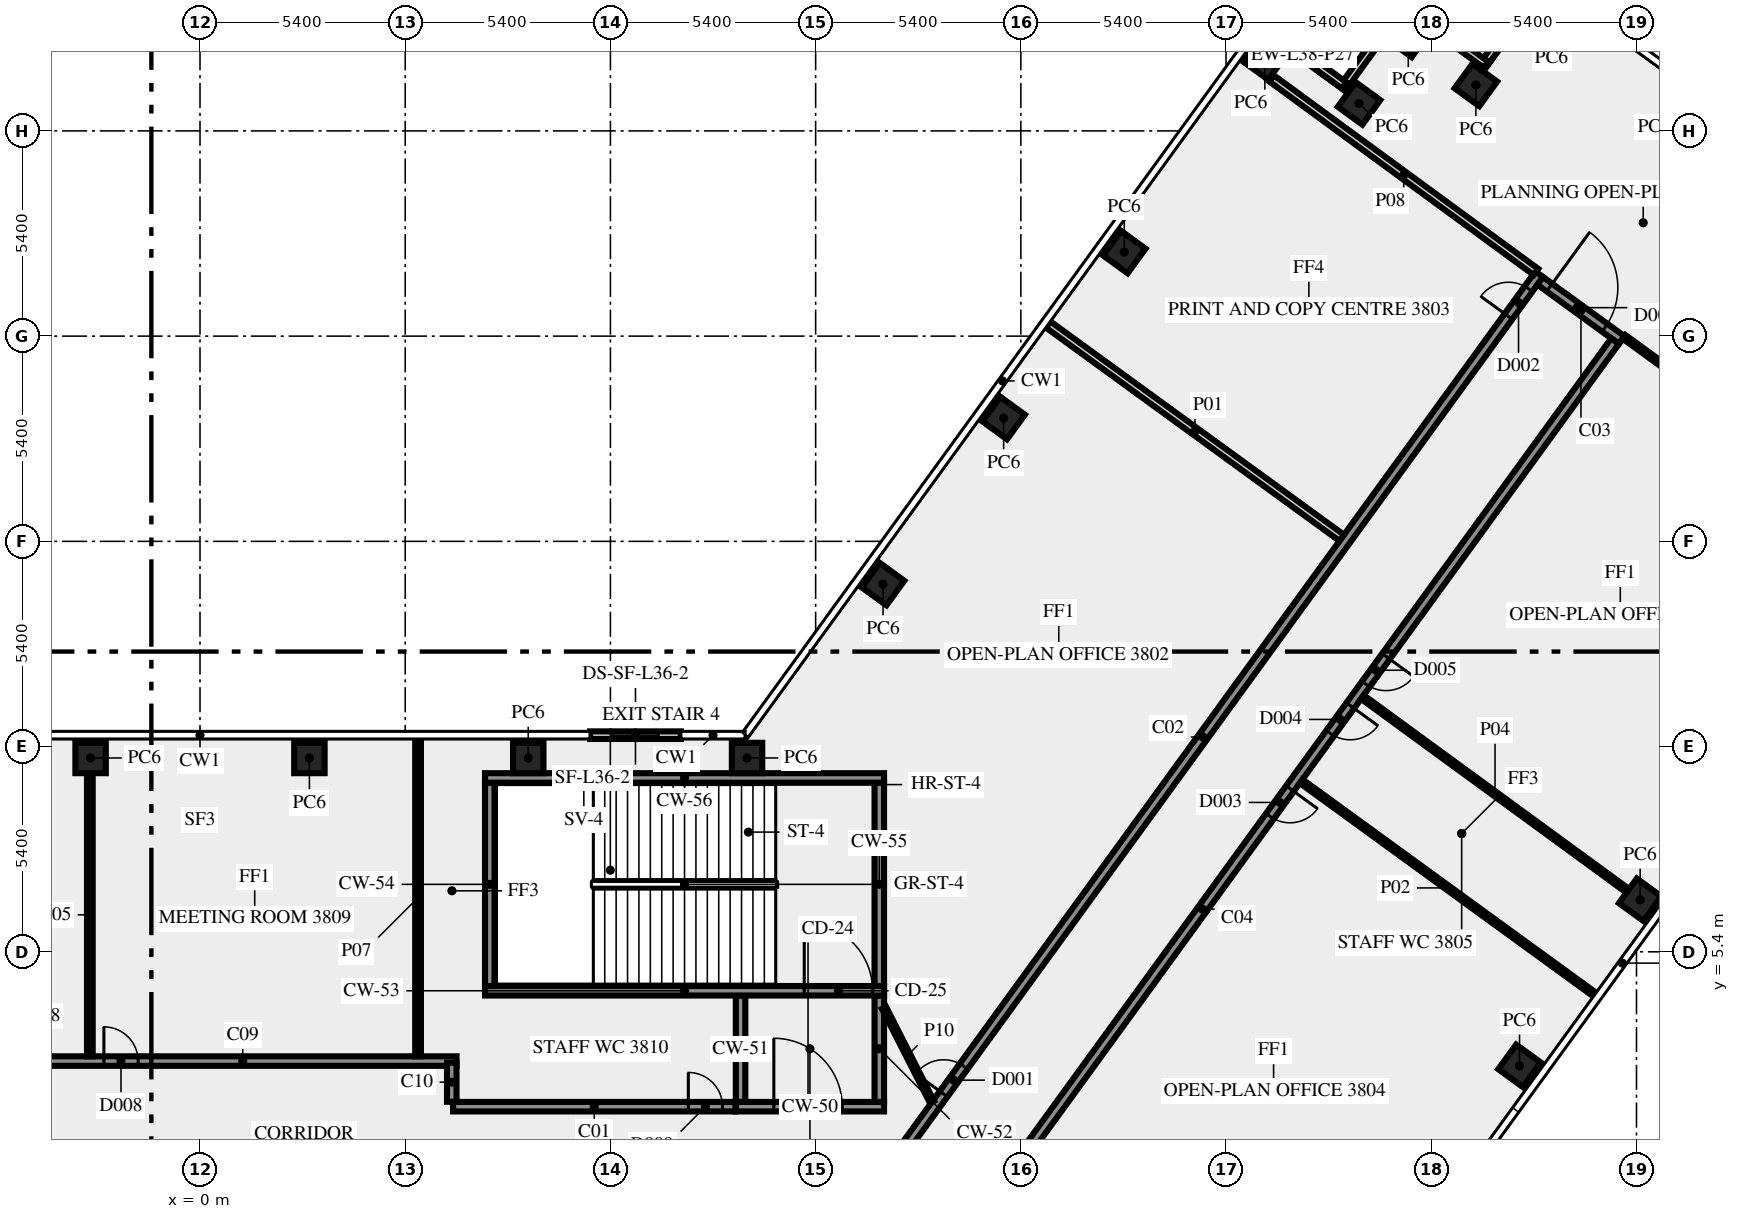
"""IFC4 building model, lengths in metres.
Left out: names, types, materials, properties, quantities, classifications, styles, units other than length and angle.
Written with IfcOpenShell. Run it as: python <this file> out.ifc"""

import sys

from ifc_helpers import new_model, si_unit, direction, frame, frame_2d, origin, origin_2d, place, context, subcontext, project, spatial, rectangle, extrude, element, fill, save


model = new_model("IFC4")
c1 = context("Model", 3, precision=1e-05, world=origin(), true_north=direction((0.0, 1.0)))
c2 = subcontext(c1, "Body", "Model", "MODEL_VIEW")
j1 = project(units=[si_unit("LENGTHUNIT", "METRE"), si_unit("PLANEANGLEUNIT", "RADIAN")], contexts=[c1])
p1 = place(None, origin())
s1 = spatial("IfcSite", under=j1, at=p1, CompositionType="ELEMENT")
p2 = place(p1, origin())
s2 = spatial("IfcBuilding", under=s1, at=p2, CompositionType="ELEMENT")
p3 = place(p2, frame((0.0, 0.0, 164.0)))
s3 = spatial("IfcBuildingStorey", under=s2, at=p3, CompositionType="ELEMENT", Elevation=164.0)
for number, where, z_axis, x_axis in (
    (1, (34.722, 2.4, 0.0), (0.0, 0.0, 1.0), (0.588, 0.809, 0.0)),
    (2, (37.896, 6.769, 0.0), (0.0, 0.0, 1.0), (0.588, 0.809, 0.0)),
    (3, (33.574, 28.209, 0.0), (0.0, 0.0, 1.0), (-0.809, 0.588, 0.0)),
    (4, (31.795, 29.5, 0.0), (0.0, 0.0, 1.0), (-0.588, -0.809, 0.0)),
    (5, (30.499, 27.723, 0.0), (0.0, 0.0, 1.0), (-0.809, 0.588, 0.0)),
    (6, (28.02, 28.905, 0.0), (0.0, 0.0, 1.0), (-0.809, 0.588, 0.0)),
    (7, (24.321, 23.812, 0.0), (0.0, 0.0, 1.0), (-0.588, -0.809, 0.0)),
    (8, (21.147, 19.444, 0.0), (0.0, 0.0, 1.0), (-0.588, -0.809, 0.0)),
    (9, (17.974, 15.075, 0.0), (0.0, 0.0, 1.0), (-0.588, -0.809, 0.0)),
    (10, (14.395, 10.5, 0.0), (0.0, 0.0, 1.0), (-1.0, 0.0, 0.0)),
    (11, (8.637, 10.5, 0.0), (0.0, 0.0, 1.0), (-1.0, 0.0, 0.0)),
    (12, (2.879, 10.5, 0.0), (0.0, 0.0, 1.0), (-1.0, 0.0, 0.0)),
    (13, (-2.879, 10.5, 0.0), (0.0, 0.0, 1.0), (-1.0, 0.0, 0.0)),
):
    element("IfcColumn", number, at=place(p3, frame(where, z_axis=z_axis, x_axis=x_axis)), inside=s3, PredefinedType="COLUMN", context=c2, shape_type="SweptSolid", body=[
        extrude(rectangle(XDim=0.8, YDim=0.8, at=origin_2d()), origin(), (0.0, 0.0, 1.0), 3.65),
    ])
for number, where, z_axis, x_axis in (
    (14, (35.388, 30.97, 0.0), (0.0, 0.0, 1.0), (-0.588, -0.809, 0.0)),
    (15, (33.838, 28.744, 0.0), (0.0, 0.0, 1.0), (-0.809, 0.588, 0.0)),
    (16, (31.67, 30.333, 0.0), (0.0, 0.0, 1.0), (-0.588, -0.809, 0.0)),
    (17, (30.106, 28.2, 0.0), (0.0, 0.0, 1.0), (-0.809, 0.588, 0.0)),
):
    element("IfcWall", number, at=place(p3, frame(where, z_axis=z_axis, x_axis=x_axis)), inside=s3, PredefinedType="SOLIDWALL", context=c2, shape_type="SweptSolid", body=[
        extrude(rectangle(XDim=2.7, YDim=0.2, at=frame_2d((1.35, 0.0))), origin(), (0.0, 0.0, 1.0), 3.65),
    ])
p4 = place(p3, frame((12.655, 11.1, 0.0), z_axis=(0.0, 0.0, 1.0), x_axis=(-1.0, 0.0, 0.0)))
e18 = element("IfcWall", 18, at=p4, inside=s3, PredefinedType="SOLIDWALL", context=c2, shape_type="SweptSolid", body=[
    extrude(rectangle(XDim=2.392, YDim=0.2, at=frame_2d((1.196, 0.0))), origin(), (0.0, 0.0, 1.0), 3.65),
])
p5 = place(p4, frame((0.596, 0.0, 1.0)))
e19 = element("IfcOpeningElement", 19, at=p5, cuts=e18, PredefinedType="OPENING", context=c2, shape_type="SweptSolid", body=[
    extrude(rectangle(XDim=1.2, YDim=1.2, at=frame_2d((0.6, 0.6))), frame((0.0, 0.11, 0.0), z_axis=(0.0, -1.0, 0.0), x_axis=(1.0, 0.0, 0.0)), (0.0, 0.0, 1.0), 0.22),
])
p6 = place(p3, frame((14.1, 1.325, 0.0), z_axis=(0.0, 0.0, 1.0), x_axis=(1.0, 0.0, 0.0)))
e20 = element("IfcWall", 20, at=p6, inside=s3, PredefinedType="SHEAR", context=c2, shape_type="SweptSolid", body=[
    extrude(rectangle(XDim=3.9, YDim=0.25, at=frame_2d((1.95, 0.0))), origin(), (0.0, 0.0, 1.0), 3.65),
])
p7 = place(p6, frame((1.0, 0.0, 0.0)))
e21 = element("IfcOpeningElement", 21, at=p7, cuts=e20, PredefinedType="OPENING", context=c2, shape_type="SweptSolid", body=[
    extrude(rectangle(XDim=1.8, YDim=2.1, at=frame_2d((0.9, 1.05))), frame((0.0, 0.135, 0.0), z_axis=(0.0, -1.0, 0.0), x_axis=(1.0, 0.0, 0.0)), (0.0, 0.0, 1.0), 0.27),
])
for number, where, z_axis, x_axis in (
    (22, (14.225, 1.45, 0.0), (0.0, 0.0, 1.0), (0.0, 1.0, 0.0)),
    (23, (17.875, 1.45, 0.0), (0.0, 0.0, 1.0), (0.0, 1.0, 0.0)),
):
    element("IfcWall", number, at=place(p3, frame(where, z_axis=z_axis, x_axis=x_axis)), inside=s3, PredefinedType="SHEAR", context=c2, shape_type="SweptSolid", body=[
        extrude(rectangle(XDim=2.8, YDim=0.25, at=frame_2d((1.4, 0.0))), origin(), (0.0, 0.0, 1.0), 3.65),
    ])
p8 = place(p3, frame((7.5, 4.375, 0.0), z_axis=(0.0, 0.0, 1.0), x_axis=(1.0, 0.0, 0.0)))
e24 = element("IfcWall", 24, at=p8, inside=s3, PredefinedType="SHEAR", context=c2, shape_type="SweptSolid", body=[
    extrude(rectangle(XDim=10.5, YDim=0.25, at=frame_2d((5.25, 0.0))), origin(), (0.0, 0.0, 1.0), 3.65),
])
p9 = place(p8, frame((8.4, 0.0, 0.0)))
e25 = element("IfcOpeningElement", 25, at=p9, cuts=e24, PredefinedType="OPENING", context=c2, shape_type="SweptSolid", body=[
    extrude(rectangle(XDim=1.8, YDim=2.1, at=frame_2d((0.9, 1.05))), frame((0.0, 0.135, 0.0), z_axis=(0.0, -1.0, 0.0), x_axis=(1.0, 0.0, 0.0)), (0.0, 0.0, 1.0), 0.27),
])
for number, where, z_axis, x_axis in (
    (26, (7.625, 4.5, 0.0), (0.0, 0.0, 1.0), (0.0, 1.0, 0.0)),
    (27, (17.875, 4.5, 0.0), (0.0, 0.0, 1.0), (0.0, 1.0, 0.0)),
):
    element("IfcWall", number, at=place(p3, frame(where, z_axis=z_axis, x_axis=x_axis)), inside=s3, PredefinedType="SHEAR", context=c2, shape_type="SweptSolid", body=[
        extrude(rectangle(XDim=5.35, YDim=0.25, at=frame_2d((2.675, 0.0))), origin(), (0.0, 0.0, 1.0), 3.65),
    ])
p10 = place(p3, frame((7.5, 9.975, 0.0), z_axis=(0.0, 0.0, 1.0), x_axis=(1.0, 0.0, 0.0)))
e28 = element("IfcWall", 28, at=p10, inside=s3, PredefinedType="SHEAR", context=c2, shape_type="SweptSolid", body=[
    extrude(rectangle(XDim=10.5, YDim=0.25, at=frame_2d((5.25, 0.0))), origin(), (0.0, 0.0, 1.0), 3.65),
])
p11 = place(p10, frame((2.0, 0.0, 1.0)))
e29 = element("IfcOpeningElement", 29, at=p11, cuts=e28, PredefinedType="OPENING", context=c2, shape_type="SweptSolid", body=[
    extrude(rectangle(XDim=1.2, YDim=1.2, at=frame_2d((0.6, 0.6))), frame((0.0, 0.135, 0.0), z_axis=(0.0, -1.0, 0.0), x_axis=(1.0, 0.0, 0.0)), (0.0, 0.0, 1.0), 0.27),
])
p12 = place(p3, frame((6.659, 1.325, 0.0), z_axis=(0.0, 0.0, 1.0), x_axis=(1.0, 0.0, 0.0)))
e30 = element("IfcWall", 30, at=p12, inside=s3, PredefinedType="SOLIDWALL", context=c2, shape_type="SweptSolid", body=[
    extrude(rectangle(XDim=7.431, YDim=0.25, at=frame_2d((3.716, 0.0))), origin(), (0.0, 0.0, 1.0), 3.65),
])
p13 = place(p12, frame((6.191, 0.0, 0.0)))
e31 = element("IfcOpeningElement", 31, at=p13, cuts=e30, PredefinedType="OPENING", context=c2, shape_type="SweptSolid", body=[
    extrude(rectangle(XDim=0.9, YDim=2.1, at=frame_2d((0.45, 1.05))), frame((0.0, 0.135, 0.0), z_axis=(0.0, -1.0, 0.0), x_axis=(1.0, 0.0, 0.0)), (0.0, 0.0, 1.0), 0.27),
])
p14 = place(p3, frame((17.545, -1.125, 0.0), z_axis=(0.0, 0.0, 1.0), x_axis=(0.587786330937, 0.809016210693, 0.0)))
e32 = element("IfcWall", 32, at=p14, inside=s3, PredefinedType="SOLIDWALL", context=c2, shape_type="SweptSolid", body=[
    extrude(rectangle(XDim=30.103, YDim=0.25, at=frame_2d((15.052, 0.0))), origin(), (0.0, 0.0, 1.0), 3.65),
])
p15 = place(p14, frame((3.441, 0.0, 0.0)))
e33 = element("IfcOpeningElement", 33, at=p15, cuts=e32, PredefinedType="OPENING", context=c2, shape_type="SweptSolid", body=[
    extrude(rectangle(XDim=0.9, YDim=2.1, at=frame_2d((0.45, 1.05))), frame((0.0, 0.135, 0.0), z_axis=(0.0, -1.0, 0.0), x_axis=(1.0, 0.0, 0.0)), (0.0, 0.0, 1.0), 0.27),
])
p16 = place(p14, frame((28.729, 0.0, 0.0)))
e34 = element("IfcOpeningElement", 34, at=p16, cuts=e32, PredefinedType="OPENING", context=c2, shape_type="SweptSolid", body=[
    extrude(rectangle(XDim=0.9, YDim=2.1, at=frame_2d((0.45, 1.05))), frame((0.0, 0.135, 0.0), z_axis=(0.0, -1.0, 0.0), x_axis=(1.0, 0.0, 0.0)), (0.0, 0.0, 1.0), 0.27),
])
p17 = place(p3, frame((35.267, 23.054, 0.0), z_axis=(0.0, 0.0, 1.0), x_axis=(0.809038743598, -0.587755315891, 0.0)))
e35 = element("IfcWall", 35, at=p17, inside=s3, PredefinedType="SOLIDWALL", context=c2, shape_type="SweptSolid", body=[
    extrude(rectangle(XDim=2.65, YDim=0.25, at=frame_2d((1.325, 0.0))), origin(), (0.0, 0.0, 1.0), 3.65),
])
p18 = place(p17, frame((0.3, 0.0, 0.0)))
e36 = element("IfcOpeningElement", 36, at=p18, cuts=e35, PredefinedType="OPENING", context=c2, shape_type="SweptSolid", body=[
    extrude(rectangle(XDim=1.8, YDim=2.1, at=frame_2d((0.9, 1.05))), frame((0.0, 0.135, 0.0), z_axis=(0.0, -1.0, 0.0), x_axis=(1.0, 0.0, 0.0)), (0.0, 0.0, 1.0), 0.27),
])
p19 = place(p3, frame((37.236, 21.469, 0.0), z_axis=(0.0, 0.0, 1.0), x_axis=(-0.58778344073, -0.809018310549, 0.0)))
e37 = element("IfcWall", 37, at=p19, inside=s3, PredefinedType="SOLIDWALL", context=c2, shape_type="SweptSolid", body=[
    extrude(rectangle(XDim=28.42, YDim=0.25, at=frame_2d((14.21, 0.0))), origin(), (0.0, 0.0, 1.0), 3.65),
])
p20 = place(p19, frame((14.554, 0.0, 0.0)))
e38 = element("IfcOpeningElement", 38, at=p20, cuts=e37, PredefinedType="OPENING", context=c2, shape_type="SweptSolid", body=[
    extrude(rectangle(XDim=0.9, YDim=2.1, at=frame_2d((0.45, 1.05))), frame((0.0, 0.135, 0.0), z_axis=(0.0, -1.0, 0.0), x_axis=(1.0, 0.0, 0.0)), (0.0, 0.0, 1.0), 0.27),
])
p21 = place(p19, frame((10.255, 0.0, 0.0)))
e39 = element("IfcOpeningElement", 39, at=p21, cuts=e37, PredefinedType="OPENING", context=c2, shape_type="SweptSolid", body=[
    extrude(rectangle(XDim=0.9, YDim=2.1, at=frame_2d((0.45, 1.05))), frame((0.0, 0.135, 0.0), z_axis=(0.0, -1.0, 0.0), x_axis=(1.0, 0.0, 0.0)), (0.0, 0.0, 1.0), 0.27),
])
p22 = place(p19, frame((11.854, 0.0, 0.0)))
e40 = element("IfcOpeningElement", 40, at=p22, cuts=e37, PredefinedType="OPENING", context=c2, shape_type="SweptSolid", body=[
    extrude(rectangle(XDim=0.9, YDim=2.1, at=frame_2d((0.45, 1.05))), frame((0.0, 0.135, 0.0), z_axis=(0.0, -1.0, 0.0), x_axis=(1.0, 0.0, 0.0)), (0.0, 0.0, 1.0), 0.27),
])
p23 = place(p3, frame((-4.5, 2.525, 0.0), z_axis=(0.0, 0.0, 1.0), x_axis=(1.0, 0.0, 0.0)))
e41 = element("IfcWall", 41, at=p23, inside=s3, PredefinedType="SOLIDWALL", context=c2, shape_type="SweptSolid", body=[
    extrude(rectangle(XDim=11.25, YDim=0.25, at=frame_2d((5.625, 0.0))), origin(), (0.0, 0.0, 1.0), 3.65),
])
p24 = place(p23, frame((1.971, 0.0, 0.0)))
e42 = element("IfcOpeningElement", 42, at=p24, cuts=e41, PredefinedType="OPENING", context=c2, shape_type="SweptSolid", body=[
    extrude(rectangle(XDim=0.9, YDim=2.1, at=frame_2d((0.45, 1.05))), frame((0.0, 0.135, 0.0), z_axis=(0.0, -1.0, 0.0), x_axis=(1.0, 0.0, 0.0)), (0.0, 0.0, 1.0), 0.27),
])
p25 = place(p3, frame((6.625, 2.484, 0.0), z_axis=(0.0, 0.0, 1.0), x_axis=(0.0, -1.0, 0.0)))
e43 = element("IfcWall", 43, at=p25, inside=s3, PredefinedType="SOLIDWALL", context=c2, shape_type="SweptSolid", body=[
    extrude(rectangle(XDim=1.03, YDim=0.25, at=frame_2d((0.515, 0.0))), origin(), (0.0, 0.0, 1.0), 3.65),
])
p26 = place(p3, frame((30.044, 16.292, 0.0), z_axis=(0.0, 0.0, 1.0), x_axis=(-0.80898585166, 0.587828114175, 0.0)))
e44 = element("IfcWall", 44, at=p26, inside=s3, PredefinedType="SOLIDWALL", context=c2, shape_type="SweptSolid", body=[
    extrude(rectangle(XDim=9.55, YDim=0.2, at=frame_2d((4.775, 0.0))), origin(), (0.0, 0.0, 1.0), 2.85),
])
p27 = place(p3, frame((36.702, 4.274, 0.0), z_axis=(0.0, 0.0, 1.0), x_axis=(-0.808998008689, 0.58781138296, 0.0)))
e45 = element("IfcWall", 45, at=p27, inside=s3, PredefinedType="PARTITIONING", context=c2, shape_type="SweptSolid", body=[
    extrude(rectangle(XDim=9.55, YDim=0.12, at=frame_2d((4.775, 0.0))), origin(), (0.0, 0.0, 1.0), 2.85),
])
p28 = place(p3, frame((42.686, 17.794, 0.0), z_axis=(0.0, 0.0, 1.0), x_axis=(-0.809017755079, 0.587784205272, 0.0)))
e46 = element("IfcWall", 46, at=p28, inside=s3, PredefinedType="PARTITIONING", context=c2, shape_type="SweptSolid", body=[
    extrude(rectangle(XDim=6.445, YDim=0.12, at=frame_2d((3.222, 0.0))), origin(), (0.0, 0.0, 1.0), 3.65),
])
p29 = place(p3, frame((30.587, 12.104, 0.0), z_axis=(0.0, 0.0, 1.0), x_axis=(0.807584089733, -0.589752437902, 0.0)))
e47 = element("IfcWall", 47, at=p29, inside=s3, PredefinedType="PARTITIONING", context=c2, shape_type="SweptSolid", body=[
    extrude(rectangle(XDim=8.645, YDim=0.12, at=frame_2d((4.322, 0.0))), origin(), (0.0, 0.0, 1.0), 3.65),
])
p30 = place(p3, frame((-2.899, 2.65, 0.0), z_axis=(0.0, 0.0, 1.0), x_axis=(0.0, 1.0, 0.0)))
e48 = element("IfcWall", 48, at=p30, inside=s3, PredefinedType="PARTITIONING", context=c2, shape_type="SweptSolid", body=[
    extrude(rectangle(XDim=7.445, YDim=0.15, at=frame_2d((3.723, 0.0))), origin(), (0.0, 0.0, 1.0), 3.65),
])
p31 = place(p3, frame((5.738, 2.65, 0.0), z_axis=(0.0, 0.0, 1.0), x_axis=(0.0, 1.0, 0.0)))
e49 = element("IfcWall", 49, at=p31, inside=s3, PredefinedType="PARTITIONING", context=c2, shape_type="SweptSolid", body=[
    extrude(rectangle(XDim=8.35, YDim=0.15, at=frame_2d((4.175, 0.0))), origin(), (0.0, 0.0, 1.0), 2.85),
])
p32 = place(p3, frame((28.198, 28.381, 0.0), z_axis=(0.0, 0.0, 1.0), x_axis=(0.806977317905, -0.590582431492, 0.0)))
e50 = element("IfcWall", 50, at=p32, inside=s3, PredefinedType="SOLIDWALL", context=c2, shape_type="SweptSolid", body=[
    extrude(rectangle(XDim=8.62, YDim=0.2, at=frame_2d((4.31, 0.0))), origin(), (0.0, 0.0, 1.0), 3.65),
])
p33 = place(p3, frame((18.0, 3.925, 0.0), z_axis=(0.0, 0.0, 1.0), x_axis=(0.453950796792, -0.891026752736, 0.0)))
e51 = element("IfcWall", 51, at=p33, inside=s3, PredefinedType="PARTITIONING", context=c2, shape_type="SweptSolid", body=[
    extrude(rectangle(XDim=2.778, YDim=0.12, at=frame_2d((1.389, 0.0))), origin(), (0.0, 0.0, 1.0), 3.65),
])
p34 = place(p5, origin())
e52 = element("IfcWindow", 52, at=p34, inside=s3, PartitioningType="SINGLE_PANEL", PredefinedType="WINDOW", context=c2, shape_type="SweptSolid", body=[
    extrude(rectangle(XDim=1.2, YDim=1.2, at=frame_2d((0.6, 0.6))), frame((0.0, 0.03, 0.0), z_axis=(0.0, -1.0, 0.0), x_axis=(1.0, 0.0, 0.0)), (0.0, 0.0, 1.0), 0.06),
])
fill(e19, e52)
p35 = place(p7, origin())
e53 = element("IfcDoor", 53, at=p35, inside=s3, OperationType="DOUBLE_DOOR_SINGLE_SWING", PredefinedType="DOOR", context=c2, shape_type="SweptSolid", body=[
    extrude(rectangle(XDim=1.8, YDim=2.1, at=frame_2d((0.9, 1.05))), frame((0.0, 0.025, 0.0), z_axis=(0.0, -1.0, 0.0), x_axis=(1.0, 0.0, 0.0)), (0.0, 0.0, 1.0), 0.05),
])
fill(e21, e53)
p36 = place(p9, origin())
e54 = element("IfcDoor", 54, at=p36, inside=s3, OperationType="DOUBLE_DOOR_SINGLE_SWING", PredefinedType="DOOR", context=c2, shape_type="SweptSolid", body=[
    extrude(rectangle(XDim=1.8, YDim=2.1, at=frame_2d((0.9, 1.05))), frame((0.0, 0.025, 0.0), z_axis=(0.0, -1.0, 0.0), x_axis=(1.0, 0.0, 0.0)), (0.0, 0.0, 1.0), 0.05),
])
fill(e25, e54)
p37 = place(p11, origin())
e55 = element("IfcWindow", 55, at=p37, inside=s3, PartitioningType="SINGLE_PANEL", PredefinedType="WINDOW", context=c2, shape_type="SweptSolid", body=[
    extrude(rectangle(XDim=1.2, YDim=1.2, at=frame_2d((0.6, 0.6))), frame((0.0, 0.03, 0.0), z_axis=(0.0, -1.0, 0.0), x_axis=(1.0, 0.0, 0.0)), (0.0, 0.0, 1.0), 0.06),
])
fill(e29, e55)
p38 = place(p15, origin())
e56 = element("IfcDoor", 56, at=p38, inside=s3, OperationType="SINGLE_SWING_LEFT", PredefinedType="DOOR", context=c2, shape_type="SweptSolid", body=[
    extrude(rectangle(XDim=0.9, YDim=2.1, at=frame_2d((0.45, 1.05))), frame((0.0, 0.025, 0.0), z_axis=(0.0, -1.0, 0.0), x_axis=(1.0, 0.0, 0.0)), (0.0, 0.0, 1.0), 0.05),
])
fill(e33, e56)
p39 = place(p20, origin())
e57 = element("IfcDoor", 57, at=p39, inside=s3, OperationType="SINGLE_SWING_LEFT", PredefinedType="DOOR", context=c2, shape_type="SweptSolid", body=[
    extrude(rectangle(XDim=0.9, YDim=2.1, at=frame_2d((0.45, 1.05))), frame((0.0, 0.025, 0.0), z_axis=(0.0, -1.0, 0.0), x_axis=(1.0, 0.0, 0.0)), (0.0, 0.0, 1.0), 0.05),
])
fill(e38, e57)
p40 = place(p21, origin())
e58 = element("IfcDoor", 58, at=p40, inside=s3, OperationType="SINGLE_SWING_RIGHT", PredefinedType="DOOR", context=c2, shape_type="SweptSolid", body=[
    extrude(rectangle(XDim=0.9, YDim=2.1, at=frame_2d((0.45, 1.05))), frame((0.0, 0.025, 0.0), z_axis=(0.0, -1.0, 0.0), x_axis=(1.0, 0.0, 0.0)), (0.0, 0.0, 1.0), 0.05),
])
fill(e39, e58)
p41 = place(p24, origin())
e59 = element("IfcDoor", 59, at=p41, inside=s3, OperationType="SINGLE_SWING_LEFT", PredefinedType="DOOR", context=c2, shape_type="SweptSolid", body=[
    extrude(rectangle(XDim=0.9, YDim=2.1, at=frame_2d((0.45, 1.05))), frame((0.0, 0.025, 0.0), z_axis=(0.0, -1.0, 0.0), x_axis=(1.0, 0.0, 0.0)), (0.0, 0.0, 1.0), 0.05),
])
fill(e42, e59)
p42 = place(p18, origin())
e60 = element("IfcDoor", 60, at=p42, inside=s3, OperationType="DOUBLE_DOOR_SINGLE_SWING", PredefinedType="DOOR", context=c2, shape_type="SweptSolid", body=[
    extrude(rectangle(XDim=1.8, YDim=2.1, at=frame_2d((0.9, 1.05))), frame((0.0, 0.025, 0.0), z_axis=(0.0, -1.0, 0.0), x_axis=(1.0, 0.0, 0.0)), (0.0, 0.0, 1.0), 0.05),
])
fill(e36, e60)
p43 = place(p16, origin())
e61 = element("IfcDoor", 61, at=p43, inside=s3, OperationType="SINGLE_SWING_RIGHT", PredefinedType="DOOR", context=c2, shape_type="SweptSolid", body=[
    extrude(rectangle(XDim=0.9, YDim=2.1, at=frame_2d((0.45, 1.05))), frame((0.0, 0.025, 0.0), z_axis=(0.0, -1.0, 0.0), x_axis=(1.0, 0.0, 0.0)), (0.0, 0.0, 1.0), 0.05),
])
fill(e34, e61)
p44 = place(p22, origin())
e62 = element("IfcDoor", 62, at=p44, inside=s3, OperationType="SINGLE_SWING_LEFT", PredefinedType="DOOR", context=c2, shape_type="SweptSolid", body=[
    extrude(rectangle(XDim=0.9, YDim=2.1, at=frame_2d((0.45, 1.05))), frame((0.0, 0.025, 0.0), z_axis=(0.0, -1.0, 0.0), x_axis=(1.0, 0.0, 0.0)), (0.0, 0.0, 1.0), 0.05),
])
fill(e40, e62)
p45 = place(p13, origin())
e63 = element("IfcDoor", 63, at=p45, inside=s3, OperationType="SINGLE_SWING_RIGHT", PredefinedType="DOOR", context=c2, shape_type="SweptSolid", body=[
    extrude(rectangle(XDim=0.9, YDim=2.1, at=frame_2d((0.45, 1.05))), frame((0.0, 0.025, 0.0), z_axis=(0.0, -1.0, 0.0), x_axis=(1.0, 0.0, 0.0)), (0.0, 0.0, 1.0), 0.05),
])
fill(e31, e63)
save(model, sys.argv[1])
